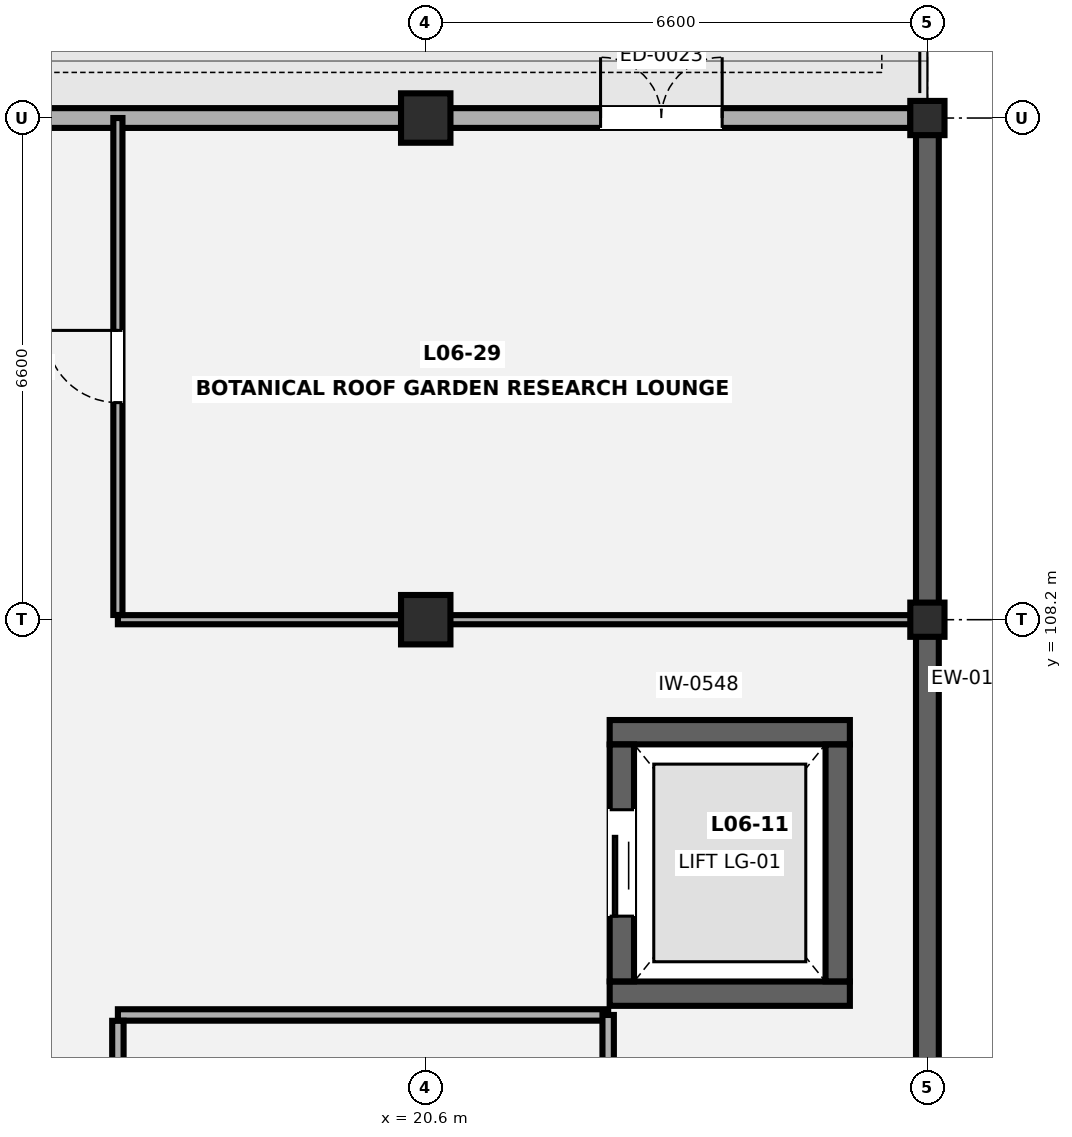
"""IFC4 building model, lengths in metres.
Left out: names, types, materials, properties, quantities, classifications, styles, units other than length and angle.
Written with IfcOpenShell. Run it as: python <this file> out.ifc"""

import sys

from ifc_helpers import new_model, si_unit, direction, frame, frame_2d, origin, origin_2d, place, context, subcontext, project, spatial, rectangle, extrude, element, fill, save


model = new_model("IFC4")
c1 = context("Model", 3, precision=1e-05, world=origin(), true_north=direction((0.0, 1.0)))
c2 = subcontext(c1, "Body", "Model", "MODEL_VIEW")
j1 = project(units=[si_unit("LENGTHUNIT", "METRE"), si_unit("PLANEANGLEUNIT", "RADIAN")], contexts=[c1])
p1 = place(None, origin())
s1 = spatial("IfcSite", under=j1, at=p1, CompositionType="ELEMENT")
p2 = place(p1, origin())
s2 = spatial("IfcBuilding", under=s1, at=p2, CompositionType="ELEMENT")
p3 = place(p2, frame((0.0, 0.0, 25.9)))
s3 = spatial("IfcBuildingStorey", under=s2, at=p3, CompositionType="ELEMENT", Elevation=25.9)
for number, where, z_axis, x_axis in (
    (1, (20.6, 108.2, 0.0), (0.0, 0.0, 1.0), (1.0, 0.0, 0.0)),
    (2, (20.6, 114.8, 0.0), (0.0, 0.0, 1.0), (1.0, 0.0, 0.0)),
):
    element("IfcColumn", number, at=place(p3, frame(where, z_axis=z_axis, x_axis=x_axis)), inside=s3, PredefinedType="COLUMN", context=c2, shape_type="SweptSolid", body=[
        extrude(rectangle(XDim=0.65, YDim=0.65, at=origin_2d()), origin(), (0.0, 0.0, 1.0), 3.95),
    ])
for number, where, z_axis, x_axis in (
    (3, (27.2, 108.2, 0.0), (0.0, 0.0, 1.0), (1.0, 0.0, 0.0)),
    (4, (27.2, 114.8, 0.0), (0.0, 0.0, 1.0), (1.0, 0.0, 0.0)),
):
    element("IfcColumn", number, at=place(p3, frame(where, z_axis=z_axis, x_axis=x_axis)), inside=s3, PredefinedType="PILASTER", context=c2, shape_type="SweptSolid", body=[
        extrude(rectangle(XDim=0.45, YDim=0.45, at=origin_2d()), origin(), (0.0, 0.0, 1.0), 3.95),
    ])
p4 = place(p3, frame((27.2, 114.577, 0.0), z_axis=(0.0, 0.0, 1.0), x_axis=(0.0, -1.0, 0.0)))
e5 = element("IfcWall", 5, at=p4, inside=s3, PredefinedType="SOLIDWALL", context=c2, shape_type="SweptSolid", body=[
    extrude(rectangle(XDim=19.354, YDim=0.3, at=frame_2d((9.677, 0.0))), origin(), (0.0, 0.0, 1.0), 3.84),
])
p5 = place(p3, frame((7.623, 114.8, 0.0), z_axis=(0.0, 0.0, 1.0), x_axis=(1.0, 0.0, 0.0)))
e6 = element("IfcWall", 6, at=p5, inside=s3, PredefinedType="SOLIDWALL", context=c2, shape_type="SweptSolid", body=[
    extrude(rectangle(XDim=19.354, YDim=0.26, at=frame_2d((9.677, 0.0))), origin(), (0.0, 0.0, 1.0), 2.48),
])
p6 = place(p5, frame((15.277, 0.0, 0.0)))
e7 = element("IfcOpeningElement", 7, at=p6, cuts=e6, PredefinedType="OPENING", context=c2, shape_type="SweptSolid", body=[
    extrude(rectangle(XDim=1.6, YDim=2.15, at=frame_2d((0.8, 1.075))), frame((0.0, 0.14, 0.0), z_axis=(0.0, -1.0, 0.0), x_axis=(1.0, 0.0, 0.0)), (0.0, 0.0, 1.0), 0.28),
])
p7 = place(p5, frame((2.477, 0.0, 0.85)))
e8 = element("IfcOpeningElement", 8, at=p7, cuts=e6, PredefinedType="OPENING", context=c2, shape_type="SweptSolid", body=[
    extrude(rectangle(XDim=1.25, YDim=1.4, at=frame_2d((0.625, 0.7))), frame((0.0, 0.14, 0.0), z_axis=(0.0, -1.0, 0.0), x_axis=(1.0, 0.0, 0.0)), (0.0, 0.0, 1.0), 0.28),
])
for number, where, z_axis, x_axis in (
    (9, (23.02, 103.28, 0.0), (0.0, 0.0, 1.0), (1.0, 0.0, 0.0)),
    (10, (23.02, 106.72, 0.0), (0.0, 0.0, 1.0), (1.0, 0.0, 0.0)),
):
    element("IfcWall", number, at=place(p3, frame(where, z_axis=z_axis, x_axis=x_axis)), inside=s3, PredefinedType="SHEAR", context=c2, shape_type="SweptSolid", body=[
        extrude(rectangle(XDim=3.16, YDim=0.32, at=frame_2d((1.58, 0.0))), origin(), (0.0, 0.0, 1.0), 4.0),
    ])
p8 = place(p3, frame((23.18, 103.442, 0.0), z_axis=(0.0, 0.0, 1.0), x_axis=(0.0, 1.0, 0.0)))
e11 = element("IfcWall", 11, at=p8, inside=s3, PredefinedType="SHEAR", context=c2, shape_type="SweptSolid", body=[
    extrude(rectangle(XDim=3.116, YDim=0.32, at=frame_2d((1.558, 0.0))), origin(), (0.0, 0.0, 1.0), 4.0),
])
p9 = place(p8, frame((0.858, 0.0, 0.0)))
e12 = element("IfcOpeningElement", 12, at=p9, cuts=e11, PredefinedType="OPENING", context=c2, shape_type="SweptSolid", body=[
    extrude(rectangle(XDim=1.4, YDim=2.25, at=frame_2d((0.7, 1.125))), frame((0.0, 0.17, 0.0), z_axis=(0.0, -1.0, 0.0), x_axis=(1.0, 0.0, 0.0)), (0.0, 0.0, 1.0), 0.34),
])
p10 = place(p3, frame((26.02, 103.442, 0.0), z_axis=(0.0, 0.0, 1.0), x_axis=(0.0, 1.0, 0.0)))
e13 = element("IfcWall", 13, at=p10, inside=s3, PredefinedType="SHEAR", context=c2, shape_type="SweptSolid", body=[
    extrude(rectangle(XDim=3.116, YDim=0.32, at=frame_2d((1.558, 0.0))), origin(), (0.0, 0.0, 1.0), 4.0),
])
p11 = place(p3, frame((16.55, 103.0, 0.0), z_axis=(0.0, 0.0, 1.0), x_axis=(1.0, 0.0, 0.0)))
e14 = element("IfcWall", 14, at=p11, inside=s3, PredefinedType="PARTITIONING", context=c2, shape_type="SweptSolid", body=[
    extrude(rectangle(XDim=6.45, YDim=0.15, at=frame_2d((3.225, 0.0))), origin(), (0.0, 0.0, 1.0), 3.98),
])
p12 = place(p3, frame((16.55, 95.0, 0.0), z_axis=(0.0, 0.0, 1.0), x_axis=(0.0, 1.0, 0.0)))
e15 = element("IfcWall", 15, at=p12, inside=s3, PredefinedType="PARTITIONING", context=c2, shape_type="SweptSolid", body=[
    extrude(rectangle(XDim=7.923, YDim=0.15, at=frame_2d((3.961, 0.0))), origin(), (0.0, 0.0, 1.0), 3.98),
])
p13 = place(p12, frame((3.312, 0.0, 0.0)))
e16 = element("IfcOpeningElement", 16, at=p13, cuts=e15, PredefinedType="OPENING", context=c2, shape_type="SweptSolid", body=[
    extrude(rectangle(XDim=1.3, YDim=2.2, at=frame_2d((0.65, 1.1))), frame((0.0, 0.085, 0.0), z_axis=(0.0, -1.0, 0.0), x_axis=(1.0, 0.0, 0.0)), (0.0, 0.0, 1.0), 0.17),
])
p14 = place(p3, frame((23.0, 95.0, 0.0), z_axis=(0.0, 0.0, 1.0), x_axis=(0.0, 1.0, 0.0)))
e17 = element("IfcWall", 17, at=p14, inside=s3, PredefinedType="PARTITIONING", context=c2, shape_type="SweptSolid", body=[
    extrude(rectangle(XDim=8.0, YDim=0.15, at=frame_2d((4.0, 0.0))), origin(), (0.0, 0.0, 1.0), 3.98),
])
p15 = place(p3, frame((16.55, 108.2, 0.0), z_axis=(0.0, 0.0, 1.0), x_axis=(1.0, 0.0, 0.0)))
e18 = element("IfcWall", 18, at=p15, inside=s3, PredefinedType="PARTITIONING", context=c2, shape_type="SweptSolid", body=[
    extrude(rectangle(XDim=10.65, YDim=0.12, at=frame_2d((5.325, 0.0))), origin(), (0.0, 0.0, 1.0), 2.435),
])
p16 = place(p3, frame((16.55, 108.262, 0.0), z_axis=(0.0, 0.0, 1.0), x_axis=(0.0, 1.0, 0.0)))
e19 = element("IfcWall", 19, at=p16, inside=s3, PredefinedType="PARTITIONING", context=c2, shape_type="SweptSolid", body=[
    extrude(rectangle(XDim=6.538, YDim=0.12, at=frame_2d((3.269, 0.0))), origin(), (0.0, 0.0, 1.0), 3.98),
])
p17 = place(p16, frame((2.794, 0.0, 0.0)))
e20 = element("IfcOpeningElement", 20, at=p17, cuts=e19, PredefinedType="OPENING", context=c2, shape_type="SweptSolid", body=[
    extrude(rectangle(XDim=0.95, YDim=2.1, at=frame_2d((0.475, 1.05))), frame((0.0, 0.07, 0.0), z_axis=(0.0, -1.0, 0.0), x_axis=(1.0, 0.0, 0.0)), (0.0, 0.0, 1.0), 0.14),
])
p18 = place(p6, origin())
e21 = element("IfcDoor", 21, at=p18, inside=s3, OperationType="DOUBLE_DOOR_SINGLE_SWING", PredefinedType="DOOR", context=c2, shape_type="SweptSolid", body=[
    extrude(rectangle(XDim=1.6, YDim=2.15, at=frame_2d((0.8, 1.075))), frame((0.0, 0.025, 0.0), z_axis=(0.0, -1.0, 0.0), x_axis=(1.0, 0.0, 0.0)), (0.0, 0.0, 1.0), 0.05),
])
fill(e7, e21)
p19 = place(p9, origin())
e22 = element("IfcDoor", 22, at=p19, inside=s3, OperationType="DOUBLE_DOOR_SLIDING", PredefinedType="DOOR", context=c2, shape_type="SweptSolid", body=[
    extrude(rectangle(XDim=1.4, YDim=2.25, at=frame_2d((0.7, 1.125))), frame((0.0, 0.025, 0.0), z_axis=(0.0, -1.0, 0.0), x_axis=(1.0, 0.0, 0.0)), (0.0, 0.0, 1.0), 0.05),
])
fill(e12, e22)
p20 = place(p17, origin())
e23 = element("IfcDoor", 23, at=p20, inside=s3, OperationType="SINGLE_SWING_RIGHT", PredefinedType="DOOR", context=c2, shape_type="SweptSolid", body=[
    extrude(rectangle(XDim=0.95, YDim=2.1, at=frame_2d((0.475, 1.05))), frame((0.0, 0.025, 0.0), z_axis=(0.0, -1.0, 0.0), x_axis=(1.0, 0.0, 0.0)), (0.0, 0.0, 1.0), 0.05),
])
fill(e20, e23)
save(model, sys.argv[1])
